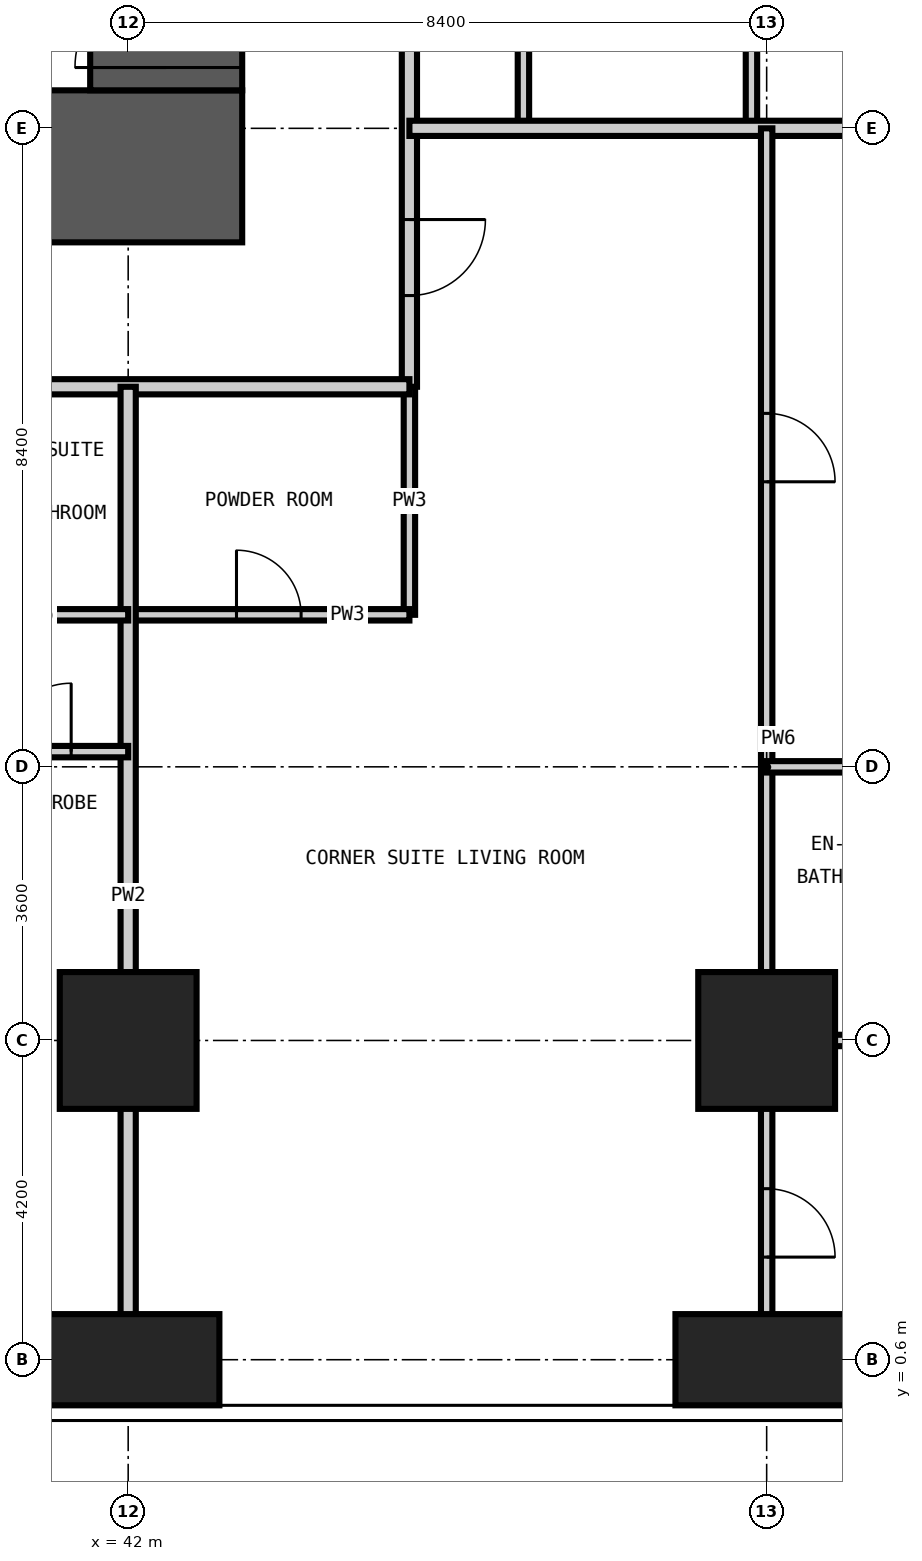
"""IFC4 building model, lengths in metres.
Left out: names, types, materials, properties, quantities, classifications, styles, units other than length and angle.
Written with IfcOpenShell. Run it as: python <this file> out.ifc"""

import sys

from ifc_helpers import new_model, si_unit, direction, frame, frame_2d, origin, origin_2d, place, context, subcontext, project, spatial, rectangle, extrude, element, fill, save


model = new_model("IFC4")
c1 = context("Model", 3, precision=1e-05, world=origin(), true_north=direction((0.0, 1.0)))
c2 = subcontext(c1, "Body", "Model", "MODEL_VIEW")
j1 = project(units=[si_unit("LENGTHUNIT", "METRE"), si_unit("PLANEANGLEUNIT", "RADIAN")], contexts=[c1])
p1 = place(None, origin())
s1 = spatial("IfcSite", under=j1, at=p1, CompositionType="ELEMENT")
p2 = place(p1, origin())
s2 = spatial("IfcBuilding", under=s1, at=p2, CompositionType="ELEMENT")
p3 = place(p2, frame((0.0, 0.0, 27.0)))
s3 = spatial("IfcBuildingStorey", under=s2, at=p3, CompositionType="ELEMENT", Elevation=27.0)
p4 = place(p3, frame((42.0, 0.6, -0.35), z_axis=(0.0, 0.0, 1.0), x_axis=(1.0, 0.0, 0.0)))
e1 = element("IfcColumn", 1, at=p4, inside=s3, PredefinedType="COLUMN", context=c2, shape_type="SweptSolid", body=[
    extrude(rectangle(XDim=2.4, YDim=1.2, at=origin_2d()), origin(), (0.0, 0.0, 1.0), 3.6),
])
p5 = place(p3, frame((42.0, 4.8, -0.35), z_axis=(0.0, 0.0, 1.0), x_axis=(1.0, 0.0, 0.0)))
e2 = element("IfcColumn", 2, at=p5, inside=s3, PredefinedType="COLUMN", context=c2, shape_type="SweptSolid", body=[
    extrude(rectangle(XDim=1.8, YDim=1.8, at=origin_2d()), origin(), (0.0, 0.0, 1.0), 3.6),
])
p6 = place(p3, frame((50.4, 0.6, -0.35), z_axis=(0.0, 0.0, 1.0), x_axis=(1.0, 0.0, 0.0)))
e3 = element("IfcColumn", 3, at=p6, inside=s3, PredefinedType="COLUMN", context=c2, shape_type="SweptSolid", body=[
    extrude(rectangle(XDim=2.4, YDim=1.2, at=origin_2d()), origin(), (0.0, 0.0, 1.0), 3.6),
])
p7 = place(p3, frame((50.4, 4.8, -0.35), z_axis=(0.0, 0.0, 1.0), x_axis=(1.0, 0.0, 0.0)))
e4 = element("IfcColumn", 4, at=p7, inside=s3, PredefinedType="COLUMN", context=c2, shape_type="SweptSolid", body=[
    extrude(rectangle(XDim=1.8, YDim=1.8, at=origin_2d()), origin(), (0.0, 0.0, 1.0), 3.6),
])
p8 = place(p3, frame((15.3, 16.3, -0.35), z_axis=(0.0, 0.0, 1.0), x_axis=(1.0, 0.0, 0.0)))
e5 = element("IfcWall", 5, at=p8, inside=s3, PredefinedType="SHEAR", context=c2, shape_type="SweptSolid", body=[
    extrude(rectangle(XDim=28.2, YDim=2.0, at=frame_2d((14.1, 0.0))), origin(), (0.0, 0.0, 1.0), 3.6),
])
p9 = place(p8, frame((13.6, 0.0, 0.35)))
e6 = element("IfcOpeningElement", 6, at=p9, cuts=e5, PredefinedType="OPENING", context=c2, shape_type="SweptSolid", body=[
    extrude(rectangle(XDim=1.0, YDim=2.1, at=frame_2d((0.5, 1.05))), frame((0.0, 1.01, 0.0), z_axis=(0.0, -1.0, 0.0), x_axis=(1.0, 0.0, 0.0)), (0.0, 0.0, 1.0), 2.02),
])
p10 = place(p8, frame((19.9, 0.0, 0.35)))
e7 = element("IfcOpeningElement", 7, at=p10, cuts=e5, PredefinedType="OPENING", context=c2, shape_type="SweptSolid", body=[
    extrude(rectangle(XDim=1.0, YDim=2.1, at=frame_2d((0.5, 1.05))), frame((0.0, 1.01, 0.0), z_axis=(0.0, -1.0, 0.0), x_axis=(1.0, 0.0, 0.0)), (0.0, 0.0, 1.0), 2.02),
])
p11 = place(p3, frame((42.5, 17.3, -0.35), z_axis=(0.0, 0.0, 1.0), x_axis=(0.0, 1.0, 0.0)))
e8 = element("IfcWall", 8, at=p11, inside=s3, PredefinedType="SHEAR", context=c2, shape_type="SweptSolid", body=[
    extrude(rectangle(XDim=24.2, YDim=2.0, at=frame_2d((12.1, 0.0))), origin(), (0.0, 0.0, 1.0), 3.6),
])
p12 = place(p11, frame((0.3, 0.0, 0.35)))
e9 = element("IfcOpeningElement", 9, at=p12, cuts=e8, PredefinedType="OPENING", context=c2, shape_type="SweptSolid", body=[
    extrude(rectangle(XDim=1.2, YDim=2.2, at=frame_2d((0.6, 1.1))), frame((0.0, 1.01, 0.0), z_axis=(0.0, -1.0, 0.0), x_axis=(1.0, 0.0, 0.0)), (0.0, 0.0, 1.0), 2.02),
])
p13 = place(p11, frame((11.6, 0.0, 0.35)))
e10 = element("IfcOpeningElement", 10, at=p13, cuts=e8, PredefinedType="OPENING", context=c2, shape_type="SweptSolid", body=[
    extrude(rectangle(XDim=1.0, YDim=2.1, at=frame_2d((0.5, 1.05))), frame((0.0, 1.01, 0.0), z_axis=(0.0, -1.0, 0.0), x_axis=(1.0, 0.0, 0.0)), (0.0, 0.0, 1.0), 2.02),
])
p14 = place(p11, frame((20.0, 0.0, 0.35)))
e11 = element("IfcOpeningElement", 11, at=p14, cuts=e8, PredefinedType="OPENING", context=c2, shape_type="SweptSolid", body=[
    extrude(rectangle(XDim=1.0, YDim=2.1, at=frame_2d((0.5, 1.05))), frame((0.0, 1.01, 0.0), z_axis=(0.0, -1.0, 0.0), x_axis=(1.0, 0.0, 0.0)), (0.0, 0.0, 1.0), 2.02),
])
p15 = place(p3, frame((45.7, 10.4, 0.0), z_axis=(0.0, 0.0, 1.0), x_axis=(0.0, 1.0, 0.0)))
e12 = element("IfcWall", 12, at=p15, inside=s3, PredefinedType="PARTITIONING", context=c2, shape_type="SweptSolid", body=[
    extrude(rectangle(XDim=3.0, YDim=0.15, at=frame_2d((1.5, 0.0))), origin(), (0.0, 0.0, 1.0), 3.25),
])
for number, where, z_axis, x_axis in (
    (13, (47.2, 16.8, 0.0), (0.0, 0.0, 1.0), (0.0, 1.0, 0.0)),
    (14, (50.2, 16.8, 0.0), (0.0, 0.0, 1.0), (0.0, 1.0, 0.0)),
):
    element("IfcWall", number, at=place(p3, frame(where, z_axis=z_axis, x_axis=x_axis)), inside=s3, PredefinedType="PARTITIONING", context=c2, shape_type="SweptSolid", body=[
        extrude(rectangle(XDim=2.7, YDim=0.15, at=frame_2d((1.35, 0.0))), origin(), (0.0, 0.0, 1.0), 3.25),
    ])
p16 = place(p3, frame((50.4, 4.8, 0.0), z_axis=(0.0, 0.0, 1.0), x_axis=(1.0, 0.0, 0.0)))
e15 = element("IfcWall", 15, at=p16, inside=s3, PredefinedType="PARTITIONING", context=c2, shape_type="SweptSolid", body=[
    extrude(rectangle(XDim=3.0, YDim=0.15, at=frame_2d((1.5, 0.0))), origin(), (0.0, 0.0, 1.0), 3.25),
])
p17 = place(p3, frame((42.0, 10.4, 0.0), z_axis=(0.0, 0.0, 1.0), x_axis=(1.0, 0.0, 0.0)))
e16 = element("IfcWall", 16, at=p17, inside=s3, PredefinedType="PARTITIONING", context=c2, shape_type="SweptSolid", body=[
    extrude(rectangle(XDim=3.7, YDim=0.15, at=frame_2d((1.85, 0.0))), origin(), (0.0, 0.0, 1.0), 3.25),
])
p18 = place(p17, frame((1.425, 0.0, 0.0)))
e17 = element("IfcOpeningElement", 17, at=p18, cuts=e16, PredefinedType="OPENING", context=c2, shape_type="SweptSolid", body=[
    extrude(rectangle(XDim=0.85, YDim=2.1, at=frame_2d((0.425, 1.05))), frame((0.0, 0.085, 0.0), z_axis=(0.0, -1.0, 0.0), x_axis=(1.0, 0.0, 0.0)), (0.0, 0.0, 1.0), 0.17),
])
p19 = place(p3, frame((45.7, 46.0, 0.0), z_axis=(0.0, 0.0, 1.0), x_axis=(0.0, -1.0, 0.0)))
e18 = element("IfcWall", 18, at=p19, inside=s3, PredefinedType="PARTITIONING", context=c2, shape_type="SweptSolid", body=[
    extrude(rectangle(XDim=32.6, YDim=0.2, at=frame_2d((16.3, 0.0))), origin(), (0.0, 0.0, 1.0), 3.25),
])
p20 = place(p19, frame((26.6, 0.0, 0.0)))
e19 = element("IfcOpeningElement", 19, at=p20, cuts=e18, PredefinedType="OPENING", context=c2, shape_type="SweptSolid", body=[
    extrude(rectangle(XDim=1.0, YDim=2.2, at=frame_2d((0.5, 1.1))), frame((0.0, 0.11, 0.0), z_axis=(0.0, -1.0, 0.0), x_axis=(1.0, 0.0, 0.0)), (0.0, 0.0, 1.0), 0.22),
])
p21 = place(p19, frame((22.4, 0.0, 0.0)))
e20 = element("IfcOpeningElement", 20, at=p21, cuts=e18, PredefinedType="OPENING", context=c2, shape_type="SweptSolid", body=[
    extrude(rectangle(XDim=1.0, YDim=2.2, at=frame_2d((0.5, 1.1))), frame((0.0, 0.11, 0.0), z_axis=(0.0, -1.0, 0.0), x_axis=(1.0, 0.0, 0.0)), (0.0, 0.0, 1.0), 0.22),
])
p22 = place(p19, frame((17.0, 0.0, 0.0)))
e21 = element("IfcOpeningElement", 21, at=p22, cuts=e18, PredefinedType="OPENING", context=c2, shape_type="SweptSolid", body=[
    extrude(rectangle(XDim=1.0, YDim=2.2, at=frame_2d((0.5, 1.1))), frame((0.0, 0.11, 0.0), z_axis=(0.0, -1.0, 0.0), x_axis=(1.0, 0.0, 0.0)), (0.0, 0.0, 1.0), 0.22),
])
p23 = place(p19, frame((15.2, 0.0, 0.0)))
e22 = element("IfcOpeningElement", 22, at=p23, cuts=e18, PredefinedType="OPENING", context=c2, shape_type="SweptSolid", body=[
    extrude(rectangle(XDim=1.0, YDim=2.2, at=frame_2d((0.5, 1.1))), frame((0.0, 0.11, 0.0), z_axis=(0.0, -1.0, 0.0), x_axis=(1.0, 0.0, 0.0)), (0.0, 0.0, 1.0), 0.22),
])
p24 = place(p19, frame((8.6, 0.0, 0.0)))
e23 = element("IfcOpeningElement", 23, at=p24, cuts=e18, PredefinedType="OPENING", context=c2, shape_type="SweptSolid", body=[
    extrude(rectangle(XDim=1.0, YDim=2.2, at=frame_2d((0.5, 1.1))), frame((0.0, 0.11, 0.0), z_axis=(0.0, -1.0, 0.0), x_axis=(1.0, 0.0, 0.0)), (0.0, 0.0, 1.0), 0.22),
])
p25 = place(p19, frame((6.8, 0.0, 0.0)))
e24 = element("IfcOpeningElement", 24, at=p25, cuts=e18, PredefinedType="OPENING", context=c2, shape_type="SweptSolid", body=[
    extrude(rectangle(XDim=1.0, YDim=2.2, at=frame_2d((0.5, 1.1))), frame((0.0, 0.11, 0.0), z_axis=(0.0, -1.0, 0.0), x_axis=(1.0, 0.0, 0.0)), (0.0, 0.0, 1.0), 0.22),
])
p26 = place(p19, frame((30.4, 0.0, 0.0)))
e25 = element("IfcOpeningElement", 25, at=p26, cuts=e18, PredefinedType="OPENING", context=c2, shape_type="SweptSolid", body=[
    extrude(rectangle(XDim=1.0, YDim=2.2, at=frame_2d((0.5, 1.1))), frame((0.0, 0.11, 0.0), z_axis=(0.0, -1.0, 0.0), x_axis=(1.0, 0.0, 0.0)), (0.0, 0.0, 1.0), 0.22),
])
p27 = place(p19, frame((1.5, 0.0, 0.0)))
e26 = element("IfcOpeningElement", 26, at=p27, cuts=e18, PredefinedType="OPENING", context=c2, shape_type="SweptSolid", body=[
    extrude(rectangle(XDim=1.0, YDim=2.2, at=frame_2d((0.5, 1.1))), frame((0.0, 0.11, 0.0), z_axis=(0.0, -1.0, 0.0), x_axis=(1.0, 0.0, 0.0)), (0.0, 0.0, 1.0), 0.22),
])
p28 = place(p3, frame((45.7, 13.4, 0.0), z_axis=(0.0, 0.0, 1.0), x_axis=(-1.0, 0.0, 0.0)))
e27 = element("IfcWall", 27, at=p28, inside=s3, PredefinedType="PARTITIONING", context=c2, shape_type="SweptSolid", body=[
    extrude(rectangle(XDim=32.3, YDim=0.2, at=frame_2d((16.15, 0.0))), origin(), (0.0, 0.0, 1.0), 3.25),
])
p29 = place(p28, frame((25.1, 0.0, 0.0)))
e28 = element("IfcOpeningElement", 28, at=p29, cuts=e27, PredefinedType="OPENING", context=c2, shape_type="SweptSolid", body=[
    extrude(rectangle(XDim=1.0, YDim=2.2, at=frame_2d((0.5, 1.1))), frame((0.0, 0.11, 0.0), z_axis=(0.0, -1.0, 0.0), x_axis=(1.0, 0.0, 0.0)), (0.0, 0.0, 1.0), 0.22),
])
p30 = place(p28, frame((23.3, 0.0, 0.0)))
e29 = element("IfcOpeningElement", 29, at=p30, cuts=e27, PredefinedType="OPENING", context=c2, shape_type="SweptSolid", body=[
    extrude(rectangle(XDim=1.0, YDim=2.2, at=frame_2d((0.5, 1.1))), frame((0.0, 0.11, 0.0), z_axis=(0.0, -1.0, 0.0), x_axis=(1.0, 0.0, 0.0)), (0.0, 0.0, 1.0), 0.22),
])
p31 = place(p28, frame((16.7, 0.0, 0.0)))
e30 = element("IfcOpeningElement", 30, at=p31, cuts=e27, PredefinedType="OPENING", context=c2, shape_type="SweptSolid", body=[
    extrude(rectangle(XDim=1.0, YDim=2.2, at=frame_2d((0.5, 1.1))), frame((0.0, 0.11, 0.0), z_axis=(0.0, -1.0, 0.0), x_axis=(1.0, 0.0, 0.0)), (0.0, 0.0, 1.0), 0.22),
])
p32 = place(p28, frame((14.9, 0.0, 0.0)))
e31 = element("IfcOpeningElement", 31, at=p32, cuts=e27, PredefinedType="OPENING", context=c2, shape_type="SweptSolid", body=[
    extrude(rectangle(XDim=1.0, YDim=2.2, at=frame_2d((0.5, 1.1))), frame((0.0, 0.11, 0.0), z_axis=(0.0, -1.0, 0.0), x_axis=(1.0, 0.0, 0.0)), (0.0, 0.0, 1.0), 0.22),
])
p33 = place(p28, frame((8.3, 0.0, 0.0)))
e32 = element("IfcOpeningElement", 32, at=p33, cuts=e27, PredefinedType="OPENING", context=c2, shape_type="SweptSolid", body=[
    extrude(rectangle(XDim=1.0, YDim=2.2, at=frame_2d((0.5, 1.1))), frame((0.0, 0.11, 0.0), z_axis=(0.0, -1.0, 0.0), x_axis=(1.0, 0.0, 0.0)), (0.0, 0.0, 1.0), 0.22),
])
p34 = place(p28, frame((6.5, 0.0, 0.0)))
e33 = element("IfcOpeningElement", 33, at=p34, cuts=e27, PredefinedType="OPENING", context=c2, shape_type="SweptSolid", body=[
    extrude(rectangle(XDim=1.0, YDim=2.2, at=frame_2d((0.5, 1.1))), frame((0.0, 0.11, 0.0), z_axis=(0.0, -1.0, 0.0), x_axis=(1.0, 0.0, 0.0)), (0.0, 0.0, 1.0), 0.22),
])
p35 = place(p3, frame((42.0, -0.008, 0.0), z_axis=(0.0, 0.0, 1.0), x_axis=(0.0, 1.0, 0.0)))
e34 = element("IfcWall", 34, at=p35, inside=s3, PredefinedType="PARTITIONING", context=c2, shape_type="SweptSolid", body=[
    extrude(rectangle(XDim=13.408, YDim=0.2, at=frame_2d((6.704, 0.0))), origin(), (0.0, 0.0, 1.0), 3.25),
])
p36 = place(p3, frame((45.7, 16.8, 0.0), z_axis=(0.0, 0.0, 1.0), x_axis=(1.0, 0.0, 0.0)))
e35 = element("IfcWall", 35, at=p36, inside=s3, PredefinedType="PARTITIONING", context=c2, shape_type="SweptSolid", body=[
    extrude(rectangle(XDim=13.108, YDim=0.2, at=frame_2d((6.554, 0.0))), origin(), (0.0, 0.0, 1.0), 3.25),
])
p37 = place(p3, frame((50.4, -0.008, 0.0), z_axis=(0.0, 0.0, 1.0), x_axis=(0.0, 1.0, 0.0)))
e36 = element("IfcWall", 36, at=p37, inside=s3, PredefinedType="PARTITIONING", context=c2, shape_type="SweptSolid", body=[
    extrude(rectangle(XDim=16.808, YDim=0.15, at=frame_2d((8.404, 0.0))), origin(), (0.0, 0.0, 1.0), 3.25),
])
p38 = place(p37, frame((1.958, 0.0, 0.0)))
e37 = element("IfcOpeningElement", 37, at=p38, cuts=e36, PredefinedType="OPENING", context=c2, shape_type="SweptSolid", body=[
    extrude(rectangle(XDim=0.9, YDim=2.1, at=frame_2d((0.45, 1.05))), frame((0.0, 0.085, 0.0), z_axis=(0.0, -1.0, 0.0), x_axis=(1.0, 0.0, 0.0)), (0.0, 0.0, 1.0), 0.17),
])
p39 = place(p37, frame((12.158, 0.0, 0.0)))
e38 = element("IfcOpeningElement", 38, at=p39, cuts=e36, PredefinedType="OPENING", context=c2, shape_type="SweptSolid", body=[
    extrude(rectangle(XDim=0.9, YDim=2.1, at=frame_2d((0.45, 1.05))), frame((0.0, 0.085, 0.0), z_axis=(0.0, -1.0, 0.0), x_axis=(1.0, 0.0, 0.0)), (0.0, 0.0, 1.0), 0.17),
])
p40 = place(p3, frame((50.4, 8.4, 0.0), z_axis=(0.0, 0.0, 1.0), x_axis=(1.0, 0.0, 0.0)))
e39 = element("IfcWall", 39, at=p40, inside=s3, PredefinedType="PARTITIONING", context=c2, shape_type="SweptSolid", body=[
    extrude(rectangle(XDim=8.408, YDim=0.15, at=frame_2d((4.204, 0.0))), origin(), (0.0, 0.0, 1.0), 3.25),
])
p41 = place(p40, frame((4.55, 0.0, 0.0)))
e40 = element("IfcOpeningElement", 40, at=p41, cuts=e39, PredefinedType="OPENING", context=c2, shape_type="SweptSolid", body=[
    extrude(rectangle(XDim=0.9, YDim=2.1, at=frame_2d((0.45, 1.05))), frame((0.0, 0.085, 0.0), z_axis=(0.0, -1.0, 0.0), x_axis=(1.0, 0.0, 0.0)), (0.0, 0.0, 1.0), 0.17),
])
p42 = place(p3, frame((39.6, 8.6, 0.0), z_axis=(0.0, 0.0, 1.0), x_axis=(1.0, 0.0, 0.0)))
e41 = element("IfcWall", 41, at=p42, inside=s3, PredefinedType="PARTITIONING", context=c2, shape_type="SweptSolid", body=[
    extrude(rectangle(XDim=2.4, YDim=0.15, at=frame_2d((1.2, 0.0))), origin(), (0.0, 0.0, 1.0), 3.25),
])
p43 = place(p42, frame((0.75, 0.0, 0.0)))
e42 = element("IfcOpeningElement", 42, at=p43, cuts=e41, PredefinedType="OPENING", context=c2, shape_type="SweptSolid", body=[
    extrude(rectangle(XDim=0.9, YDim=2.1, at=frame_2d((0.45, 1.05))), frame((0.0, 0.085, 0.0), z_axis=(0.0, -1.0, 0.0), x_axis=(1.0, 0.0, 0.0)), (0.0, 0.0, 1.0), 0.17),
])
p44 = place(p3, frame((39.6, 10.4, 0.0), z_axis=(0.0, 0.0, 1.0), x_axis=(1.0, 0.0, 0.0)))
e43 = element("IfcWall", 43, at=p44, inside=s3, PredefinedType="PARTITIONING", context=c2, shape_type="SweptSolid", body=[
    extrude(rectangle(XDim=2.4, YDim=0.15, at=frame_2d((1.2, 0.0))), origin(), (0.0, 0.0, 1.0), 3.25),
])
p45 = place(p12, origin())
e44 = element("IfcDoor", 44, at=p45, inside=s3, OperationType="SINGLE_SWING_LEFT", PredefinedType="DOOR", context=c2, shape_type="SweptSolid", body=[
    extrude(rectangle(XDim=1.2, YDim=2.2, at=frame_2d((0.6, 1.1))), frame((0.0, 0.025, 0.0), z_axis=(0.0, -1.0, 0.0), x_axis=(1.0, 0.0, 0.0)), (0.0, 0.0, 1.0), 0.05),
])
fill(e9, e44)
p46 = place(p43, origin())
e45 = element("IfcDoor", 45, at=p46, inside=s3, OperationType="SINGLE_SWING_RIGHT", PredefinedType="DOOR", context=c2, shape_type="SweptSolid", body=[
    extrude(rectangle(XDim=0.9, YDim=2.1, at=frame_2d((0.45, 1.05))), frame((0.0, 0.025, 0.0), z_axis=(0.0, -1.0, 0.0), x_axis=(1.0, 0.0, 0.0)), (0.0, 0.0, 1.0), 0.05),
])
fill(e42, e45)
p47 = place(p26, origin())
e46 = element("IfcDoor", 46, at=p47, inside=s3, OperationType="SINGLE_SWING_LEFT", PredefinedType="DOOR", context=c2, shape_type="SweptSolid", body=[
    extrude(rectangle(XDim=1.0, YDim=2.2, at=frame_2d((0.5, 1.1))), frame((0.0, 0.025, 0.0), z_axis=(0.0, -1.0, 0.0), x_axis=(1.0, 0.0, 0.0)), (0.0, 0.0, 1.0), 0.05),
])
fill(e25, e46)
p48 = place(p18, origin())
e47 = element("IfcDoor", 47, at=p48, inside=s3, OperationType="SINGLE_SWING_LEFT", PredefinedType="DOOR", context=c2, shape_type="SweptSolid", body=[
    extrude(rectangle(XDim=0.85, YDim=2.1, at=frame_2d((0.425, 1.05))), frame((0.0, 0.025, 0.0), z_axis=(0.0, -1.0, 0.0), x_axis=(1.0, 0.0, 0.0)), (0.0, 0.0, 1.0), 0.05),
])
fill(e17, e47)
p49 = place(p38, frame((0.9, 0.0, 0.0), z_axis=(0.0, 0.0, 1.0), x_axis=(-1.0, 0.0, 0.0)))
e48 = element("IfcDoor", 48, at=p49, inside=s3, OperationType="SINGLE_SWING_RIGHT", PredefinedType="DOOR", context=c2, shape_type="SweptSolid", body=[
    extrude(rectangle(XDim=0.9, YDim=2.1, at=frame_2d((0.45, 1.05))), frame((0.0, 0.025, 0.0), z_axis=(0.0, -1.0, 0.0), x_axis=(1.0, 0.0, 0.0)), (0.0, 0.0, 1.0), 0.05),
])
fill(e37, e48)
p50 = place(p39, frame((0.9, 0.0, 0.0), z_axis=(0.0, 0.0, 1.0), x_axis=(-1.0, 0.0, 0.0)))
e49 = element("IfcDoor", 49, at=p50, inside=s3, OperationType="SINGLE_SWING_RIGHT", PredefinedType="DOOR", context=c2, shape_type="SweptSolid", body=[
    extrude(rectangle(XDim=0.9, YDim=2.1, at=frame_2d((0.45, 1.05))), frame((0.0, 0.025, 0.0), z_axis=(0.0, -1.0, 0.0), x_axis=(1.0, 0.0, 0.0)), (0.0, 0.0, 1.0), 0.05),
])
fill(e38, e49)
save(model, sys.argv[1])
